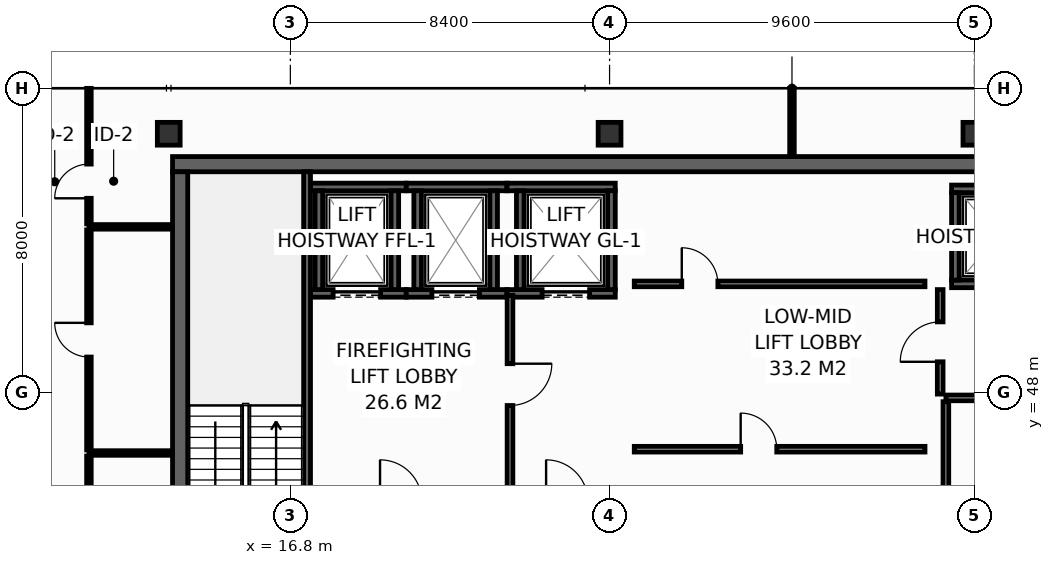
"""IFC4 building model, lengths in metres.
Left out: names, types, materials, properties, quantities, classifications, styles, units other than length and angle.
Written with IfcOpenShell. Run it as: python <this file> out.ifc"""

import sys

from ifc_helpers import new_model, si_unit, direction, frame, frame_2d, origin, origin_2d, place, context, subcontext, project, spatial, rectangle, hollow_rectangle, extrude, element, fill, save


model = new_model("IFC4")
c1 = context("Model", 3, precision=1e-05, world=origin(), true_north=direction((0.0, 1.0)))
c2 = subcontext(c1, "Body", "Model", "MODEL_VIEW")
j1 = project(units=[si_unit("LENGTHUNIT", "METRE"), si_unit("PLANEANGLEUNIT", "RADIAN")], contexts=[c1])
p1 = place(None, origin())
s1 = spatial("IfcSite", under=j1, at=p1, CompositionType="ELEMENT")
p2 = place(p1, origin())
s2 = spatial("IfcBuilding", under=s1, at=p2, CompositionType="ELEMENT")
p3 = place(p2, frame((0.0, 0.0, 283.8)))
s3 = spatial("IfcBuildingStorey", under=s2, at=p3, CompositionType="ELEMENT", Elevation=283.8)
p4 = place(p3, frame((13.7, 54.0, 0.0), z_axis=(0.0, 0.0, 1.0), x_axis=(1.0, 0.0, 0.0)))
e1 = element("IfcWall", 1, at=p4, inside=s3, PredefinedType="SHEAR", context=c2, shape_type="SweptSolid", body=[
    extrude(rectangle(XDim=32.5, YDim=0.4, at=frame_2d((16.25, 0.0))), origin(), (0.0, 0.0, 1.0), 3.55),
])
p5 = place(p3, frame((13.9, 43.4, 0.0), z_axis=(0.0, 0.0, 1.0), x_axis=(0.0, 1.0, 0.0)))
e2 = element("IfcWall", 2, at=p5, inside=s3, PredefinedType="SHEAR", context=c2, shape_type="SweptSolid", body=[
    extrude(rectangle(XDim=10.4, YDim=0.4, at=frame_2d((5.2, 0.0))), origin(), (0.0, 0.0, 1.0), 3.55),
])
for number, where, z_axis, x_axis in (
    (3, (13.6, 54.8, 0.0), (0.0, 0.0, 1.0), (1.0, 0.0, 0.0)),
    (4, (25.2, 54.8, 0.0), (0.0, 0.0, 1.0), (1.0, 0.0, 0.0)),
    (5, (34.8, 54.8, 0.0), (0.0, 0.0, 1.0), (1.0, 0.0, 0.0)),
):
    element("IfcColumn", number, at=place(p3, frame(where, z_axis=z_axis, x_axis=x_axis)), inside=s3, PredefinedType="COLUMN", context=c2, shape_type="SweptSolid", body=[
        extrude(hollow_rectangle(XDim=0.6, YDim=0.6, WallThickness=0.028, at=origin_2d()), origin(), (0.0, 0.0, 1.0), 3.8),
    ])
p6 = place(p3, frame((17.33, 50.6, 0.0), z_axis=(0.0, 0.0, 1.0), x_axis=(1.0, 0.0, 0.0)))
e6 = element("IfcWall", 6, at=p6, inside=s3, PredefinedType="SHEAR", context=c2, shape_type="SweptSolid", body=[
    extrude(rectangle(XDim=2.52, YDim=0.2, at=frame_2d((1.26, 0.0))), origin(), (0.0, 0.0, 1.0), 3.55),
])
p7 = place(p6, frame((0.595, 0.0, 0.0)))
e7 = element("IfcOpeningElement", 7, at=p7, cuts=e6, PredefinedType="OPENING", context=c2, shape_type="SweptSolid", body=[
    extrude(rectangle(XDim=1.25, YDim=2.3, at=frame_2d((0.625, 1.15))), frame((0.0, 0.11, 0.0), z_axis=(0.0, -1.0, 0.0), x_axis=(1.0, 0.0, 0.0)), (0.0, 0.0, 1.0), 0.22),
])
p8 = place(p3, frame((17.33, 53.4, 0.0), z_axis=(0.0, 0.0, 1.0), x_axis=(1.0, 0.0, 0.0)))
e8 = element("IfcWall", 8, at=p8, inside=s3, PredefinedType="SHEAR", context=c2, shape_type="SweptSolid", body=[
    extrude(rectangle(XDim=2.52, YDim=0.2, at=frame_2d((1.26, 0.0))), origin(), (0.0, 0.0, 1.0), 3.55),
])
for number, where, z_axis, x_axis in (
    (9, (17.55, 50.7, 0.0), (0.0, 0.0, 1.0), (0.0, 1.0, 0.0)),
    (10, (19.55, 50.7, 0.0), (0.0, 0.0, 1.0), (0.0, 1.0, 0.0)),
):
    element("IfcWall", number, at=place(p3, frame(where, z_axis=z_axis, x_axis=x_axis)), inside=s3, PredefinedType="SHEAR", context=c2, shape_type="SweptSolid", body=[
        extrude(rectangle(XDim=2.6, YDim=0.2, at=frame_2d((1.3, 0.0))), origin(), (0.0, 0.0, 1.0), 3.55),
    ])
p9 = place(p3, frame((19.85, 50.6, 0.0), z_axis=(0.0, 0.0, 1.0), x_axis=(1.0, 0.0, 0.0)))
e11 = element("IfcWall", 11, at=p9, inside=s3, PredefinedType="SHEAR", context=c2, shape_type="SweptSolid", body=[
    extrude(rectangle(XDim=2.65, YDim=0.2, at=frame_2d((1.325, 0.0))), origin(), (0.0, 0.0, 1.0), 3.55),
])
p10 = place(p9, frame((0.675, 0.0, 0.0)))
e12 = element("IfcOpeningElement", 12, at=p10, cuts=e11, PredefinedType="OPENING", context=c2, shape_type="SweptSolid", body=[
    extrude(rectangle(XDim=1.25, YDim=2.3, at=frame_2d((0.625, 1.15))), frame((0.0, 0.11, 0.0), z_axis=(0.0, -1.0, 0.0), x_axis=(1.0, 0.0, 0.0)), (0.0, 0.0, 1.0), 0.22),
])
p11 = place(p3, frame((19.85, 53.4, 0.0), z_axis=(0.0, 0.0, 1.0), x_axis=(1.0, 0.0, 0.0)))
e13 = element("IfcWall", 13, at=p11, inside=s3, PredefinedType="SHEAR", context=c2, shape_type="SweptSolid", body=[
    extrude(rectangle(XDim=2.65, YDim=0.2, at=frame_2d((1.325, 0.0))), origin(), (0.0, 0.0, 1.0), 3.55),
])
for number, where, z_axis, x_axis in (
    (14, (20.15, 50.7, 0.0), (0.0, 0.0, 1.0), (0.0, 1.0, 0.0)),
    (15, (22.15, 50.7, 0.0), (0.0, 0.0, 1.0), (0.0, 1.0, 0.0)),
):
    element("IfcWall", number, at=place(p3, frame(where, z_axis=z_axis, x_axis=x_axis)), inside=s3, PredefinedType="SHEAR", context=c2, shape_type="SweptSolid", body=[
        extrude(rectangle(XDim=2.6, YDim=0.2, at=frame_2d((1.3, 0.0))), origin(), (0.0, 0.0, 1.0), 3.55),
    ])
p12 = place(p3, frame((22.5, 50.6, 0.0), z_axis=(0.0, 0.0, 1.0), x_axis=(1.0, 0.0, 0.0)))
e16 = element("IfcWall", 16, at=p12, inside=s3, PredefinedType="SHEAR", context=c2, shape_type="SweptSolid", body=[
    extrude(rectangle(XDim=2.85, YDim=0.2, at=frame_2d((1.425, 0.0))), origin(), (0.0, 0.0, 1.0), 3.55),
])
p13 = place(p12, frame((0.925, 0.0, 0.0)))
e17 = element("IfcOpeningElement", 17, at=p13, cuts=e16, PredefinedType="OPENING", context=c2, shape_type="SweptSolid", body=[
    extrude(rectangle(XDim=1.25, YDim=2.3, at=frame_2d((0.625, 1.15))), frame((0.0, 0.11, 0.0), z_axis=(0.0, -1.0, 0.0), x_axis=(1.0, 0.0, 0.0)), (0.0, 0.0, 1.0), 0.22),
])
p14 = place(p3, frame((22.5, 53.4, 0.0), z_axis=(0.0, 0.0, 1.0), x_axis=(1.0, 0.0, 0.0)))
e18 = element("IfcWall", 18, at=p14, inside=s3, PredefinedType="SHEAR", context=c2, shape_type="SweptSolid", body=[
    extrude(rectangle(XDim=2.85, YDim=0.2, at=frame_2d((1.425, 0.0))), origin(), (0.0, 0.0, 1.0), 3.55),
])
for number, where, z_axis, x_axis in (
    (19, (22.85, 50.7, 0.0), (0.0, 0.0, 1.0), (0.0, 1.0, 0.0)),
    (20, (25.25, 50.7, 0.0), (0.0, 0.0, 1.0), (0.0, 1.0, 0.0)),
):
    element("IfcWall", number, at=place(p3, frame(where, z_axis=z_axis, x_axis=x_axis)), inside=s3, PredefinedType="SHEAR", context=c2, shape_type="SweptSolid", body=[
        extrude(rectangle(XDim=2.6, YDim=0.2, at=frame_2d((1.3, 0.0))), origin(), (0.0, 0.0, 1.0), 3.55),
    ])
p15 = place(p3, frame((34.2, 50.85, 0.0), z_axis=(0.0, 0.0, 1.0), x_axis=(1.0, 0.0, 0.0)))
e21 = element("IfcWall", 21, at=p15, inside=s3, PredefinedType="SHEAR", context=c2, shape_type="SweptSolid", body=[
    extrude(rectangle(XDim=2.575, YDim=0.2, at=frame_2d((1.288, 0.0))), origin(), (0.0, 0.0, 1.0), 3.55),
])
p16 = place(p15, frame((0.65, 0.0, 0.0)))
e22 = element("IfcOpeningElement", 22, at=p16, cuts=e21, PredefinedType="OPENING", context=c2, shape_type="SweptSolid", body=[
    extrude(rectangle(XDim=1.1, YDim=2.2, at=frame_2d((0.55, 1.1))), frame((0.0, 0.11, 0.0), z_axis=(0.0, -1.0, 0.0), x_axis=(1.0, 0.0, 0.0)), (0.0, 0.0, 1.0), 0.22),
])
p17 = place(p3, frame((34.2, 53.35, 0.0), z_axis=(0.0, 0.0, 1.0), x_axis=(1.0, 0.0, 0.0)))
e23 = element("IfcWall", 23, at=p17, inside=s3, PredefinedType="SHEAR", context=c2, shape_type="SweptSolid", body=[
    extrude(rectangle(XDim=2.575, YDim=0.2, at=frame_2d((1.288, 0.0))), origin(), (0.0, 0.0, 1.0), 3.55),
])
p18 = place(p3, frame((34.3, 50.95, 0.0), z_axis=(0.0, 0.0, 1.0), x_axis=(0.0, 1.0, 0.0)))
e24 = element("IfcWall", 24, at=p18, inside=s3, PredefinedType="SHEAR", context=c2, shape_type="SweptSolid", body=[
    extrude(rectangle(XDim=2.3, YDim=0.2, at=frame_2d((1.15, 0.0))), origin(), (0.0, 0.0, 1.0), 3.55),
])
p19 = place(p3, frame((17.24, 43.4, 0.0), z_axis=(0.0, 0.0, 1.0), x_axis=(0.0, 1.0, 0.0)))
e25 = element("IfcWall", 25, at=p19, inside=s3, PredefinedType="SHEAR", context=c2, shape_type="SweptSolid", body=[
    extrude(rectangle(XDim=10.4, YDim=0.18, at=frame_2d((5.2, 0.0))), origin(), (0.0, 0.0, 1.0), 3.55),
])
p20 = place(p19, frame((0.16, 0.0, 0.0)))
e26 = element("IfcOpeningElement", 26, at=p20, cuts=e25, PredefinedType="OPENING", context=c2, shape_type="SweptSolid", body=[
    extrude(rectangle(XDim=1.0, YDim=2.15, at=frame_2d((0.5, 1.075))), frame((0.0, 0.1, 0.0), z_axis=(0.0, -1.0, 0.0), x_axis=(1.0, 0.0, 0.0)), (0.0, 0.0, 1.0), 0.2),
])
p21 = place(p3, frame((22.58, 50.55, 0.0), z_axis=(0.0, 0.0, 1.0), x_axis=(0.0, -1.0, 0.0)))
e27 = element("IfcWall", 27, at=p21, inside=s3, PredefinedType="PARTITIONING", context=c2, shape_type="SweptSolid", body=[
    extrude(rectangle(XDim=5.33, YDim=0.15, at=frame_2d((2.665, 0.0))), origin(), (0.0, 0.0, 1.0), 3.55),
])
p22 = place(p21, frame((1.8, 0.0, 0.0)))
e28 = element("IfcOpeningElement", 28, at=p22, cuts=e27, PredefinedType="OPENING", context=c2, shape_type="SweptSolid", body=[
    extrude(rectangle(XDim=1.1, YDim=2.15, at=frame_2d((0.55, 1.075))), frame((0.0, 0.085, 0.0), z_axis=(0.0, -1.0, 0.0), x_axis=(1.0, 0.0, 0.0)), (0.0, 0.0, 1.0), 0.17),
])
p23 = place(p3, frame((33.9, 47.95, 0.0), z_axis=(0.0, 0.0, 1.0), x_axis=(0.0, 1.0, 0.0)))
e29 = element("IfcWall", 29, at=p23, inside=s3, PredefinedType="PARTITIONING", context=c2, shape_type="SweptSolid", body=[
    extrude(rectangle(XDim=2.75, YDim=0.15, at=frame_2d((1.375, 0.0))), origin(), (0.0, 0.0, 1.0), 3.55),
])
p24 = place(p23, frame((0.85, 0.0, 0.0)))
e30 = element("IfcOpeningElement", 30, at=p24, cuts=e29, PredefinedType="OPENING", context=c2, shape_type="SweptSolid", body=[
    extrude(rectangle(XDim=1.05, YDim=2.15, at=frame_2d((0.525, 1.075))), frame((0.0, 0.085, 0.0), z_axis=(0.0, -1.0, 0.0), x_axis=(1.0, 0.0, 0.0)), (0.0, 0.0, 1.0), 0.17),
])
p25 = place(p3, frame((34.05, 47.85, 0.0), z_axis=(0.0, 0.0, 1.0), x_axis=(1.0, 0.0, 0.0)))
e31 = element("IfcWall", 31, at=p25, inside=s3, PredefinedType="PARTITIONING", context=c2, shape_type="SweptSolid", body=[
    extrude(rectangle(XDim=8.45, YDim=0.15, at=frame_2d((4.225, 0.0))), origin(), (0.0, 0.0, 1.0), 3.55),
])
p26 = place(p3, frame((34.05, 45.22, 0.0), z_axis=(0.0, 0.0, 1.0), x_axis=(0.0, 1.0, 0.0)))
e32 = element("IfcWall", 32, at=p26, inside=s3, PredefinedType="PARTITIONING", context=c2, shape_type="SweptSolid", body=[
    extrude(rectangle(XDim=2.53, YDim=0.15, at=frame_2d((1.265, 0.0))), origin(), (0.0, 0.0, 1.0), 3.55),
])
p27 = place(p3, frame((25.85, 50.85, 0.0), z_axis=(0.0, 0.0, 1.0), x_axis=(1.0, 0.0, 0.0)))
e33 = element("IfcWall", 33, at=p27, inside=s3, PredefinedType="PARTITIONING", context=c2, shape_type="SweptSolid", body=[
    extrude(rectangle(XDim=7.65, YDim=0.15, at=frame_2d((3.825, 0.0))), origin(), (0.0, 0.0, 1.0), 3.55),
])
p28 = place(p27, frame((1.25, 0.0, 0.0)))
e34 = element("IfcOpeningElement", 34, at=p28, cuts=e33, PredefinedType="OPENING", context=c2, shape_type="SweptSolid", body=[
    extrude(rectangle(XDim=0.95, YDim=2.15, at=frame_2d((0.475, 1.075))), frame((0.0, 0.085, 0.0), z_axis=(0.0, -1.0, 0.0), x_axis=(1.0, 0.0, 0.0)), (0.0, 0.0, 1.0), 0.17),
])
p29 = place(p3, frame((25.85, 46.5, 0.0), z_axis=(0.0, 0.0, 1.0), x_axis=(1.0, 0.0, 0.0)))
e35 = element("IfcWall", 35, at=p29, inside=s3, PredefinedType="PARTITIONING", context=c2, shape_type="SweptSolid", body=[
    extrude(rectangle(XDim=7.65, YDim=0.15, at=frame_2d((3.825, 0.0))), origin(), (0.0, 0.0, 1.0), 3.55),
])
p30 = place(p29, frame((2.8, 0.0, 0.0)))
e36 = element("IfcOpeningElement", 36, at=p30, cuts=e35, PredefinedType="OPENING", context=c2, shape_type="SweptSolid", body=[
    extrude(rectangle(XDim=0.95, YDim=2.15, at=frame_2d((0.475, 1.075))), frame((0.0, 0.085, 0.0), z_axis=(0.0, -1.0, 0.0), x_axis=(1.0, 0.0, 0.0)), (0.0, 0.0, 1.0), 0.17),
])
p31 = place(p3, frame((11.5, 52.35, 0.0), z_axis=(0.0, 0.0, 1.0), x_axis=(1.0, 0.0, 0.0)))
e37 = element("IfcWall", 37, at=p31, inside=s3, PredefinedType="PARTITIONING", context=c2, shape_type="SweptSolid", body=[
    extrude(rectangle(XDim=2.18, YDim=0.12, at=frame_2d((1.09, 0.0))), origin(), (0.0, 0.0, 1.0), 3.55),
])
p32 = place(p3, frame((30.0, 54.22, 0.0), z_axis=(0.0, 0.0, 1.0), x_axis=(0.0, 1.0, 0.0)))
e38 = element("IfcWall", 38, at=p32, inside=s3, PredefinedType="PARTITIONING", context=c2, shape_type="SweptSolid", body=[
    extrude(rectangle(XDim=1.775, YDim=0.12, at=frame_2d((0.888, 0.0))), origin(), (0.0, 0.0, 1.0), 2.935),
])
p33 = place(p3, frame((11.5, 52.43, 0.0), z_axis=(0.0, 0.0, 1.0), x_axis=(0.0, 1.0, 0.0)))
e39 = element("IfcWall", 39, at=p33, inside=s3, PredefinedType="PARTITIONING", context=c2, shape_type="SweptSolid", body=[
    extrude(rectangle(XDim=3.565, YDim=0.12, at=frame_2d((1.783, 0.0))), origin(), (0.0, 0.0, 1.0), 2.935),
])
p34 = place(p33, frame((0.672, 0.0, 0.0)))
e40 = element("IfcOpeningElement", 40, at=p34, cuts=e39, PredefinedType="OPENING", context=c2, shape_type="SweptSolid", body=[
    extrude(rectangle(XDim=0.9, YDim=2.1, at=frame_2d((0.45, 1.05))), frame((0.0, 0.07, 0.0), z_axis=(0.0, -1.0, 0.0), x_axis=(1.0, 0.0, 0.0)), (0.0, 0.0, 1.0), 0.14),
])
p35 = place(p3, frame((11.5, 46.4, 0.0), z_axis=(0.0, 0.0, 1.0), x_axis=(1.0, 0.0, 0.0)))
e41 = element("IfcWall", 41, at=p35, inside=s3, PredefinedType="PARTITIONING", context=c2, shape_type="SweptSolid", body=[
    extrude(rectangle(XDim=2.18, YDim=0.12, at=frame_2d((1.09, 0.0))), origin(), (0.0, 0.0, 1.0), 3.55),
])
p36 = place(p3, frame((11.5, 41.03, 0.0), z_axis=(0.0, 0.0, 1.0), x_axis=(0.0, 1.0, 0.0)))
e42 = element("IfcWall", 42, at=p36, inside=s3, PredefinedType="PARTITIONING", context=c2, shape_type="SweptSolid", body=[
    extrude(rectangle(XDim=5.29, YDim=0.12, at=frame_2d((2.645, 0.0))), origin(), (0.0, 0.0, 1.0), 2.947),
])
p37 = place(p36, frame((2.12, 0.0, 0.0)))
e43 = element("IfcOpeningElement", 43, at=p37, cuts=e42, PredefinedType="OPENING", context=c2, shape_type="SweptSolid", body=[
    extrude(rectangle(XDim=1.05, YDim=2.15, at=frame_2d((0.525, 1.075))), frame((0.0, 0.07, 0.0), z_axis=(0.0, -1.0, 0.0), x_axis=(1.0, 0.0, 0.0)), (0.0, 0.0, 1.0), 0.14),
])
p38 = place(p3, frame((11.5, 46.48, 0.0), z_axis=(0.0, 0.0, 1.0), x_axis=(0.0, 1.0, 0.0)))
e44 = element("IfcWall", 44, at=p38, inside=s3, PredefinedType="PARTITIONING", context=c2, shape_type="SweptSolid", body=[
    extrude(rectangle(XDim=5.79, YDim=0.12, at=frame_2d((2.895, 0.0))), origin(), (0.0, 0.0, 1.0), 3.55),
])
p39 = place(p38, frame((2.445, 0.0, 0.0)))
e45 = element("IfcOpeningElement", 45, at=p39, cuts=e44, PredefinedType="OPENING", context=c2, shape_type="SweptSolid", body=[
    extrude(rectangle(XDim=0.9, YDim=2.1, at=frame_2d((0.45, 1.05))), frame((0.0, 0.07, 0.0), z_axis=(0.0, -1.0, 0.0), x_axis=(1.0, 0.0, 0.0)), (0.0, 0.0, 1.0), 0.14),
])
p40 = place(p7, origin())
e46 = element("IfcDoor", 46, at=p40, inside=s3, OperationType="SLIDING_TO_LEFT", PredefinedType="DOOR", context=c2, shape_type="SweptSolid", body=[
    extrude(rectangle(XDim=1.25, YDim=2.3, at=frame_2d((0.625, 1.15))), frame((0.0, 0.025, 0.0), z_axis=(0.0, -1.0, 0.0), x_axis=(1.0, 0.0, 0.0)), (0.0, 0.0, 1.0), 0.05),
])
fill(e7, e46)
p41 = place(p10, origin())
e47 = element("IfcDoor", 47, at=p41, inside=s3, OperationType="SLIDING_TO_LEFT", PredefinedType="DOOR", context=c2, shape_type="SweptSolid", body=[
    extrude(rectangle(XDim=1.25, YDim=2.3, at=frame_2d((0.625, 1.15))), frame((0.0, 0.025, 0.0), z_axis=(0.0, -1.0, 0.0), x_axis=(1.0, 0.0, 0.0)), (0.0, 0.0, 1.0), 0.05),
])
fill(e12, e47)
p42 = place(p13, origin())
e48 = element("IfcDoor", 48, at=p42, inside=s3, OperationType="SLIDING_TO_LEFT", PredefinedType="DOOR", context=c2, shape_type="SweptSolid", body=[
    extrude(rectangle(XDim=1.25, YDim=2.3, at=frame_2d((0.625, 1.15))), frame((0.0, 0.025, 0.0), z_axis=(0.0, -1.0, 0.0), x_axis=(1.0, 0.0, 0.0)), (0.0, 0.0, 1.0), 0.05),
])
fill(e17, e48)
p43 = place(p22, origin())
e49 = element("IfcDoor", 49, at=p43, inside=s3, OperationType="SINGLE_SWING_LEFT", PredefinedType="DOOR", context=c2, shape_type="SweptSolid", body=[
    extrude(rectangle(XDim=1.1, YDim=2.15, at=frame_2d((0.55, 1.075))), frame((0.0, 0.025, 0.0), z_axis=(0.0, -1.0, 0.0), x_axis=(1.0, 0.0, 0.0)), (0.0, 0.0, 1.0), 0.05),
])
fill(e28, e49)
p44 = place(p24, origin())
e50 = element("IfcDoor", 50, at=p44, inside=s3, OperationType="SINGLE_SWING_LEFT", PredefinedType="DOOR", context=c2, shape_type="SweptSolid", body=[
    extrude(rectangle(XDim=1.05, YDim=2.15, at=frame_2d((0.525, 1.075))), frame((0.0, 0.025, 0.0), z_axis=(0.0, -1.0, 0.0), x_axis=(1.0, 0.0, 0.0)), (0.0, 0.0, 1.0), 0.05),
])
fill(e30, e50)
p45 = place(p28, origin())
e51 = element("IfcDoor", 51, at=p45, inside=s3, OperationType="SINGLE_SWING_LEFT", PredefinedType="DOOR", context=c2, shape_type="SweptSolid", body=[
    extrude(rectangle(XDim=0.95, YDim=2.15, at=frame_2d((0.475, 1.075))), frame((0.0, 0.025, 0.0), z_axis=(0.0, -1.0, 0.0), x_axis=(1.0, 0.0, 0.0)), (0.0, 0.0, 1.0), 0.05),
])
fill(e34, e51)
p46 = place(p30, origin())
e52 = element("IfcDoor", 52, at=p46, inside=s3, OperationType="SINGLE_SWING_LEFT", PredefinedType="DOOR", context=c2, shape_type="SweptSolid", body=[
    extrude(rectangle(XDim=0.95, YDim=2.15, at=frame_2d((0.475, 1.075))), frame((0.0, 0.025, 0.0), z_axis=(0.0, -1.0, 0.0), x_axis=(1.0, 0.0, 0.0)), (0.0, 0.0, 1.0), 0.05),
])
fill(e36, e52)
p47 = place(p34, origin())
e53 = element("IfcDoor", 53, at=p47, inside=s3, OperationType="SINGLE_SWING_LEFT", PredefinedType="DOOR", context=c2, shape_type="SweptSolid", body=[
    extrude(rectangle(XDim=0.9, YDim=2.1, at=frame_2d((0.45, 1.05))), frame((0.0, 0.025, 0.0), z_axis=(0.0, -1.0, 0.0), x_axis=(1.0, 0.0, 0.0)), (0.0, 0.0, 1.0), 0.05),
])
fill(e40, e53)
p48 = place(p39, origin())
e54 = element("IfcDoor", 54, at=p48, inside=s3, OperationType="SINGLE_SWING_RIGHT", PredefinedType="DOOR", context=c2, shape_type="SweptSolid", body=[
    extrude(rectangle(XDim=0.9, YDim=2.1, at=frame_2d((0.45, 1.05))), frame((0.0, 0.025, 0.0), z_axis=(0.0, -1.0, 0.0), x_axis=(1.0, 0.0, 0.0)), (0.0, 0.0, 1.0), 0.05),
])
fill(e45, e54)
save(model, sys.argv[1])
